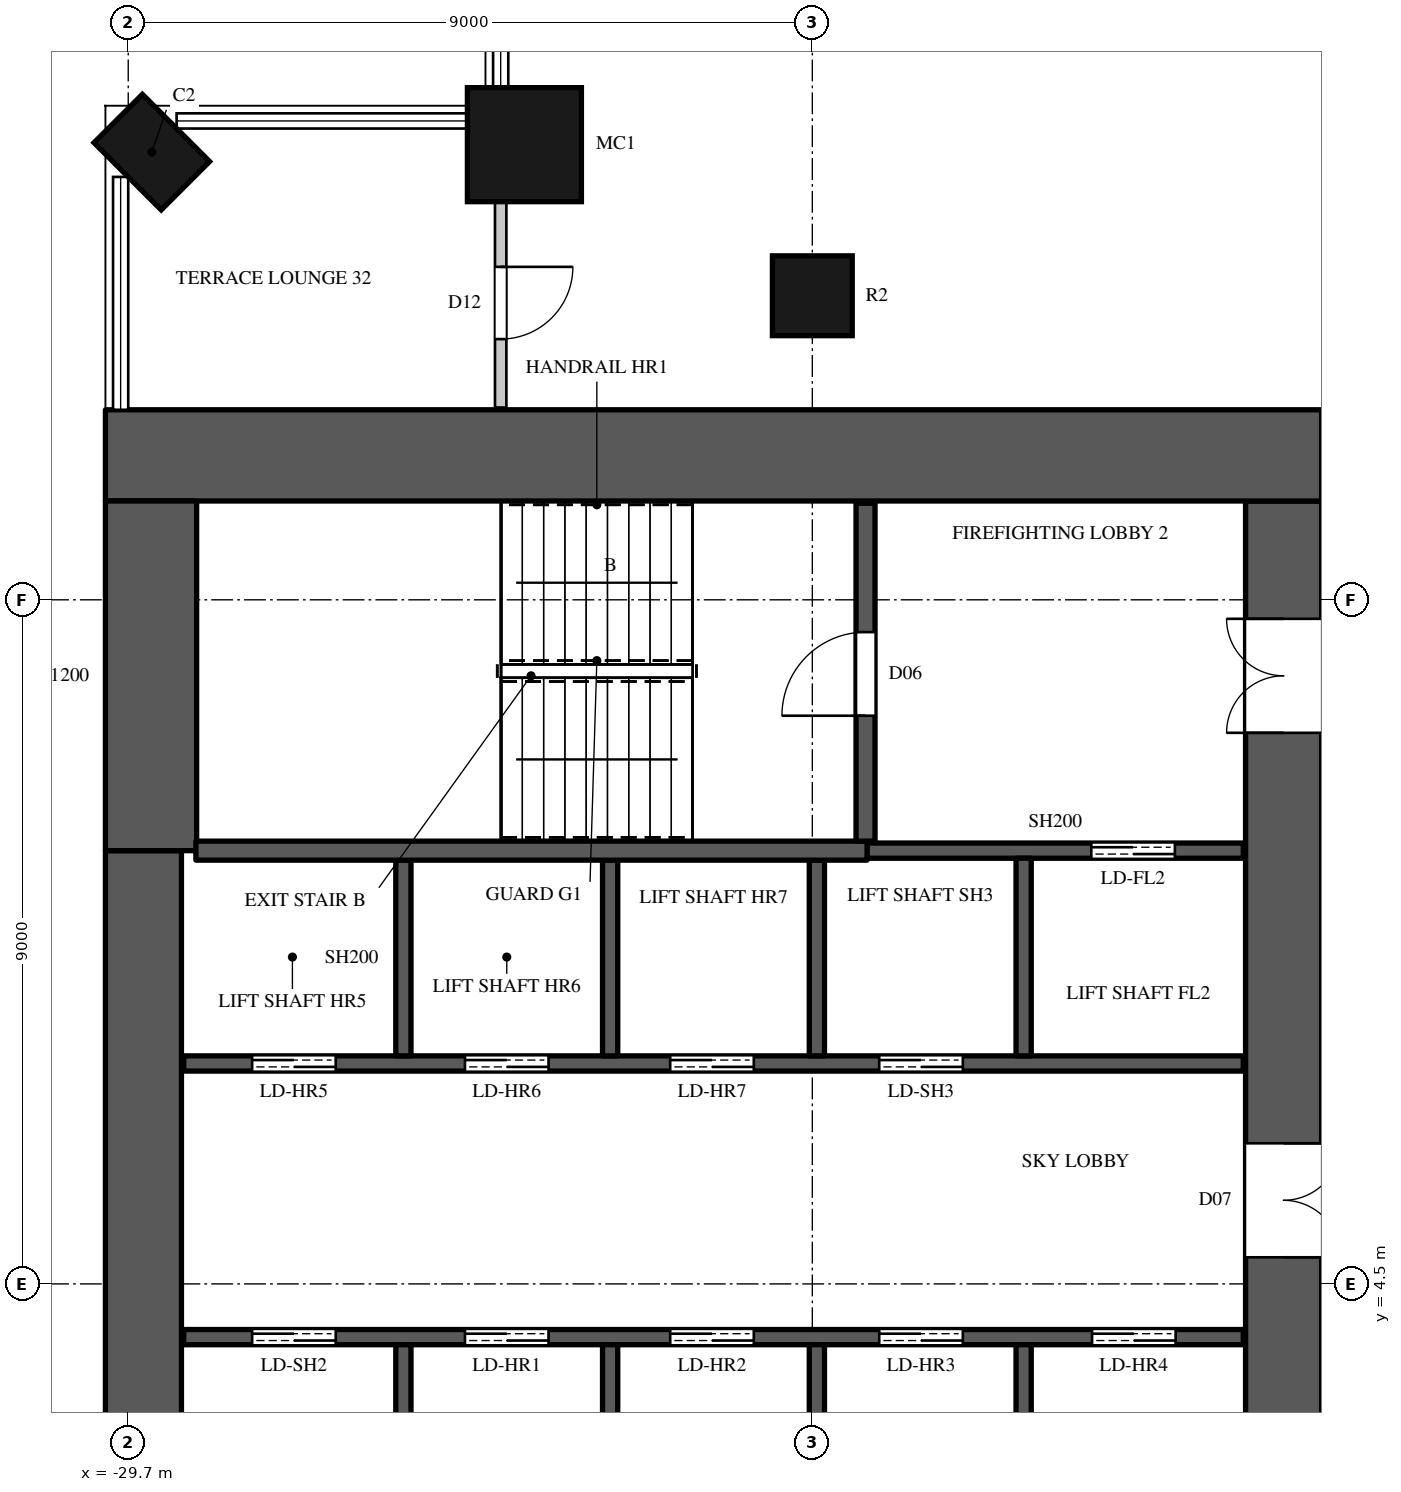
"""IFC4 building model, lengths in metres.
Left out: names, types, materials, properties, quantities, classifications, styles, units other than length and angle.
Written with IfcOpenShell. Run it as: python <this file> out.ifc"""

import sys

from ifc_helpers import new_model, si_unit, direction, frame, frame_2d, origin, origin_2d, place, context, subcontext, project, spatial, rectangle, circle, extrude, element, fill, save


model = new_model("IFC4")
c1 = context("Model", 3, precision=1e-05, world=origin(), true_north=direction((0.0, 1.0)))
c2 = subcontext(c1, "Body", "Model", "MODEL_VIEW")
j1 = project(units=[si_unit("LENGTHUNIT", "METRE"), si_unit("PLANEANGLEUNIT", "RADIAN")], contexts=[c1])
p1 = place(None, origin())
s1 = spatial("IfcSite", under=j1, at=p1, CompositionType="ELEMENT")
p2 = place(p1, origin())
s2 = spatial("IfcBuilding", under=s1, at=p2, CompositionType="ELEMENT")
p3 = place(p2, frame((0.0, 0.0, 145.5)))
s3 = spatial("IfcBuildingStorey", under=s2, at=p3, CompositionType="ELEMENT", Elevation=145.5)
p4 = place(p3, frame((-29.39, 19.39, 0.0), z_axis=(0.0, 0.0, 1.0), x_axis=(-0.707106781187, -0.707106781187, 0.0)))
e1 = element("IfcColumn", 1, at=p4, inside=s3, PredefinedType="COLUMN", context=c2, shape_type="SweptSolid", body=[
    extrude(rectangle(XDim=0.9, YDim=1.25, at=origin_2d()), origin(), (0.0, 0.0, 1.0), 7.0),
])
p5 = place(p3, frame((-24.488, 19.488, 0.0), z_axis=(0.0, 0.0, 1.0), x_axis=(1.0, 0.0, 0.0)))
e2 = element("IfcColumn", 2, at=p5, inside=s3, PredefinedType="COLUMN", context=c2, shape_type="SweptSolid", body=[
    extrude(circle(Radius=0.75, at=origin_2d()), origin(), (0.0, 0.0, 1.0), 7.0),
])
p6 = place(p3, frame((-20.7, 17.5, 0.0), z_axis=(0.0, 0.0, 1.0), x_axis=(1.0, 0.0, 0.0)))
e3 = element("IfcColumn", 3, at=p6, inside=s3, PredefinedType="COLUMN", context=c2, shape_type="SweptSolid", body=[
    extrude(circle(Radius=0.525, at=origin_2d()), origin(), (0.0, 0.0, 1.0), 7.0),
])
p7 = place(p3, frame((-30.0, 15.4, 0.0), z_axis=(0.0, 0.0, 1.0), x_axis=(1.0, 0.0, 0.0)))
e4 = element("IfcWall", 4, at=p7, inside=s3, PredefinedType="SHEAR", context=c2, shape_type="SweptSolid", body=[
    extrude(rectangle(XDim=16.0, YDim=1.2, at=frame_2d((8.0, 0.0))), origin(), (0.0, 0.0, 1.0), 7.0),
])
p8 = place(p3, frame((-14.5, -14.8, 0.0), z_axis=(0.0, 0.0, 1.0), x_axis=(0.0, 1.0, 0.0)))
e5 = element("IfcWall", 5, at=p8, inside=s3, PredefinedType="SHEAR", context=c2, shape_type="SweptSolid", body=[
    extrude(rectangle(XDim=29.6, YDim=1.0, at=frame_2d((14.8, 0.0))), origin(), (0.0, 0.0, 1.0), 7.0),
])
p9 = place(p8, frame((1.55, 0.0, 0.0)))
e6 = element("IfcOpeningElement", 6, at=p9, cuts=e5, PredefinedType="OPENING", context=c2, shape_type="SweptSolid", body=[
    extrude(rectangle(XDim=1.5, YDim=2.4, at=frame_2d((0.75, 1.2))), frame((0.0, 0.51, 0.0), z_axis=(0.0, -1.0, 0.0), x_axis=(1.0, 0.0, 0.0)), (0.0, 0.0, 1.0), 1.02),
])
p10 = place(p8, frame((26.55, 0.0, 0.0)))
e7 = element("IfcOpeningElement", 7, at=p10, cuts=e5, PredefinedType="OPENING", context=c2, shape_type="SweptSolid", body=[
    extrude(rectangle(XDim=1.5, YDim=2.4, at=frame_2d((0.75, 1.2))), frame((0.0, 0.51, 0.0), z_axis=(0.0, -1.0, 0.0), x_axis=(1.0, 0.0, 0.0)), (0.0, 0.0, 1.0), 1.02),
])
p11 = place(p8, frame((8.45, 0.0, 0.0)))
e8 = element("IfcOpeningElement", 8, at=p11, cuts=e5, PredefinedType="OPENING", context=c2, shape_type="SweptSolid", body=[
    extrude(rectangle(XDim=1.5, YDim=2.4, at=frame_2d((0.75, 1.2))), frame((0.0, 0.51, 0.0), z_axis=(0.0, -1.0, 0.0), x_axis=(1.0, 0.0, 0.0)), (0.0, 0.0, 1.0), 1.02),
])
p12 = place(p8, frame((19.65, 0.0, 0.0)))
e9 = element("IfcOpeningElement", 9, at=p12, cuts=e5, PredefinedType="OPENING", context=c2, shape_type="SweptSolid", body=[
    extrude(rectangle(XDim=1.5, YDim=2.4, at=frame_2d((0.75, 1.2))), frame((0.0, 0.51, 0.0), z_axis=(0.0, -1.0, 0.0), x_axis=(1.0, 0.0, 0.0)), (0.0, 0.0, 1.0), 1.02),
])
p13 = place(p8, frame((14.5, 0.0, 0.0)))
e10 = element("IfcOpeningElement", 10, at=p13, cuts=e5, PredefinedType="OPENING", context=c2, shape_type="SweptSolid", body=[
    extrude(rectangle(XDim=0.6, YDim=2.0, at=frame_2d((0.3, 1.0))), frame((0.0, 0.51, 0.0), z_axis=(0.0, -1.0, 0.0), x_axis=(1.0, 0.0, 0.0)), (0.0, 0.0, 1.0), 1.02),
])
p14 = place(p3, frame((-29.5, -10.2, 0.0), z_axis=(0.0, 0.0, 1.0), x_axis=(0.0, 1.0, 0.0)))
e11 = element("IfcWall", 11, at=p14, inside=s3, PredefinedType="SHEAR", context=c2, shape_type="SweptSolid", body=[
    extrude(rectangle(XDim=20.4, YDim=1.0, at=frame_2d((10.2, 0.0))), origin(), (0.0, 0.0, 1.0), 7.0),
])
p15 = place(p3, frame((-29.4, 10.2, 0.0), z_axis=(0.0, 0.0, 1.0), x_axis=(0.0, 1.0, 0.0)))
e12 = element("IfcWall", 12, at=p15, inside=s3, PredefinedType="SHEAR", context=c2, shape_type="SweptSolid", body=[
    extrude(rectangle(XDim=4.6, YDim=1.2, at=frame_2d((2.3, 0.0))), origin(), (0.0, 0.0, 1.0), 7.0),
])
p16 = place(p3, frame((-24.8, 16.03, 0.0), z_axis=(0.0, 0.0, 1.0), x_axis=(0.0, 1.0, 0.0)))
e13 = element("IfcWall", 13, at=p16, inside=s3, PredefinedType="PARTITIONING", context=c2, shape_type="SweptSolid", body=[
    extrude(rectangle(XDim=2.758, YDim=0.15, at=frame_2d((1.379, 0.0))), origin(), (0.0, 0.0, 1.0), 6.7),
])
p17 = place(p16, frame((0.9, 0.0, 0.0)))
e14 = element("IfcOpeningElement", 14, at=p17, cuts=e13, PredefinedType="OPENING", context=c2, shape_type="SweptSolid", body=[
    extrude(rectangle(XDim=0.95, YDim=2.2, at=frame_2d((0.475, 1.1))), frame((0.0, 0.085, 0.0), z_axis=(0.0, -1.0, 0.0), x_axis=(1.0, 0.0, 0.0)), (0.0, 0.0, 1.0), 0.17),
])
p18 = place(p3, frame((-28.97, 3.8, 0.0), z_axis=(0.0, 0.0, 1.0), x_axis=(1.0, 0.0, 0.0)))
e15 = element("IfcWall", 15, at=p18, inside=s3, PredefinedType="SHEAR", context=c2, shape_type="SweptSolid", body=[
    extrude(rectangle(XDim=13.94, YDim=0.2, at=frame_2d((6.97, 0.0))), origin(), (0.0, 0.0, 1.0), 6.7),
])
p19 = place(p18, frame((0.9, 0.0, 0.0)))
e16 = element("IfcOpeningElement", 16, at=p19, cuts=e15, PredefinedType="OPENING", context=c2, shape_type="SweptSolid", body=[
    extrude(rectangle(XDim=1.1, YDim=2.2, at=frame_2d((0.55, 1.1))), frame((0.0, 0.11, 0.0), z_axis=(0.0, -1.0, 0.0), x_axis=(1.0, 0.0, 0.0)), (0.0, 0.0, 1.0), 0.22),
])
p20 = place(p18, frame((3.7, 0.0, 0.0)))
e17 = element("IfcOpeningElement", 17, at=p20, cuts=e15, PredefinedType="OPENING", context=c2, shape_type="SweptSolid", body=[
    extrude(rectangle(XDim=1.1, YDim=2.2, at=frame_2d((0.55, 1.1))), frame((0.0, 0.11, 0.0), z_axis=(0.0, -1.0, 0.0), x_axis=(1.0, 0.0, 0.0)), (0.0, 0.0, 1.0), 0.22),
])
p21 = place(p18, frame((6.4, 0.0, 0.0)))
e18 = element("IfcOpeningElement", 18, at=p21, cuts=e15, PredefinedType="OPENING", context=c2, shape_type="SweptSolid", body=[
    extrude(rectangle(XDim=1.1, YDim=2.2, at=frame_2d((0.55, 1.1))), frame((0.0, 0.11, 0.0), z_axis=(0.0, -1.0, 0.0), x_axis=(1.0, 0.0, 0.0)), (0.0, 0.0, 1.0), 0.22),
])
p22 = place(p18, frame((9.15, 0.0, 0.0)))
e19 = element("IfcOpeningElement", 19, at=p22, cuts=e15, PredefinedType="OPENING", context=c2, shape_type="SweptSolid", body=[
    extrude(rectangle(XDim=1.1, YDim=2.2, at=frame_2d((0.55, 1.1))), frame((0.0, 0.11, 0.0), z_axis=(0.0, -1.0, 0.0), x_axis=(1.0, 0.0, 0.0)), (0.0, 0.0, 1.0), 0.22),
])
p23 = place(p18, frame((11.95, 0.0, 0.0)))
e20 = element("IfcOpeningElement", 20, at=p23, cuts=e15, PredefinedType="OPENING", context=c2, shape_type="SweptSolid", body=[
    extrude(rectangle(XDim=1.1, YDim=2.2, at=frame_2d((0.55, 1.1))), frame((0.0, 0.11, 0.0), z_axis=(0.0, -1.0, 0.0), x_axis=(1.0, 0.0, 0.0)), (0.0, 0.0, 1.0), 0.22),
])
p24 = place(p3, frame((-28.97, 7.4, 0.0), z_axis=(0.0, 0.0, 1.0), x_axis=(1.0, 0.0, 0.0)))
e21 = element("IfcWall", 21, at=p24, inside=s3, PredefinedType="SHEAR", context=c2, shape_type="SweptSolid", body=[
    extrude(rectangle(XDim=13.94, YDim=0.2, at=frame_2d((6.97, 0.0))), origin(), (0.0, 0.0, 1.0), 6.7),
])
p25 = place(p24, frame((0.9, 0.0, 0.0)))
e22 = element("IfcOpeningElement", 22, at=p25, cuts=e21, PredefinedType="OPENING", context=c2, shape_type="SweptSolid", body=[
    extrude(rectangle(XDim=1.1, YDim=2.2, at=frame_2d((0.55, 1.1))), frame((0.0, 0.11, 0.0), z_axis=(0.0, -1.0, 0.0), x_axis=(1.0, 0.0, 0.0)), (0.0, 0.0, 1.0), 0.22),
])
p26 = place(p24, frame((3.7, 0.0, 0.0)))
e23 = element("IfcOpeningElement", 23, at=p26, cuts=e21, PredefinedType="OPENING", context=c2, shape_type="SweptSolid", body=[
    extrude(rectangle(XDim=1.1, YDim=2.2, at=frame_2d((0.55, 1.1))), frame((0.0, 0.11, 0.0), z_axis=(0.0, -1.0, 0.0), x_axis=(1.0, 0.0, 0.0)), (0.0, 0.0, 1.0), 0.22),
])
p27 = place(p24, frame((6.4, 0.0, 0.0)))
e24 = element("IfcOpeningElement", 24, at=p27, cuts=e21, PredefinedType="OPENING", context=c2, shape_type="SweptSolid", body=[
    extrude(rectangle(XDim=1.1, YDim=2.2, at=frame_2d((0.55, 1.1))), frame((0.0, 0.11, 0.0), z_axis=(0.0, -1.0, 0.0), x_axis=(1.0, 0.0, 0.0)), (0.0, 0.0, 1.0), 0.22),
])
p28 = place(p24, frame((9.15, 0.0, 0.0)))
e25 = element("IfcOpeningElement", 25, at=p28, cuts=e21, PredefinedType="OPENING", context=c2, shape_type="SweptSolid", body=[
    extrude(rectangle(XDim=1.1, YDim=2.2, at=frame_2d((0.55, 1.1))), frame((0.0, 0.11, 0.0), z_axis=(0.0, -1.0, 0.0), x_axis=(1.0, 0.0, 0.0)), (0.0, 0.0, 1.0), 0.22),
])
p29 = place(p3, frame((-26.08, 1.1, 0.0), z_axis=(0.0, 0.0, 1.0), x_axis=(0.0, 1.0, 0.0)))
e26 = element("IfcWall", 26, at=p29, inside=s3, PredefinedType="SHEAR", context=c2, shape_type="SweptSolid", body=[
    extrude(rectangle(XDim=2.6, YDim=0.2, at=frame_2d((1.3, 0.0))), origin(), (0.0, 0.0, 1.0), 6.7),
])
p30 = place(p3, frame((-26.08, 7.5, -1.0), z_axis=(0.0, 0.0, 1.0), x_axis=(0.0, 1.0, 0.0)))
e27 = element("IfcWall", 27, at=p30, inside=s3, PredefinedType="SHEAR", context=c2, shape_type="SweptSolid", body=[
    extrude(rectangle(XDim=2.575, YDim=0.2, at=frame_2d((1.288, 0.0))), origin(), (0.0, 0.0, 1.0), 8.0),
])
p31 = place(p3, frame((-23.36, 1.1, -1.0), z_axis=(0.0, 0.0, 1.0), x_axis=(0.0, 1.0, 0.0)))
e28 = element("IfcWall", 28, at=p31, inside=s3, PredefinedType="SHEAR", context=c2, shape_type="SweptSolid", body=[
    extrude(rectangle(XDim=2.6, YDim=0.2, at=frame_2d((1.3, 0.0))), origin(), (0.0, 0.0, 1.0), 8.0),
])
p32 = place(p3, frame((-23.36, 7.5, -1.0), z_axis=(0.0, 0.0, 1.0), x_axis=(0.0, 1.0, 0.0)))
e29 = element("IfcWall", 29, at=p32, inside=s3, PredefinedType="SHEAR", context=c2, shape_type="SweptSolid", body=[
    extrude(rectangle(XDim=2.575, YDim=0.2, at=frame_2d((1.288, 0.0))), origin(), (0.0, 0.0, 1.0), 8.0),
])
p33 = place(p3, frame((-20.64, 1.1, -1.0), z_axis=(0.0, 0.0, 1.0), x_axis=(0.0, 1.0, 0.0)))
e30 = element("IfcWall", 30, at=p33, inside=s3, PredefinedType="SHEAR", context=c2, shape_type="SweptSolid", body=[
    extrude(rectangle(XDim=2.6, YDim=0.2, at=frame_2d((1.3, 0.0))), origin(), (0.0, 0.0, 1.0), 8.0),
])
p34 = place(p3, frame((-20.64, 7.5, 0.0), z_axis=(0.0, 0.0, 1.0), x_axis=(0.0, 1.0, 0.0)))
e31 = element("IfcWall", 31, at=p34, inside=s3, PredefinedType="SHEAR", context=c2, shape_type="SweptSolid", body=[
    extrude(rectangle(XDim=2.575, YDim=0.2, at=frame_2d((1.288, 0.0))), origin(), (0.0, 0.0, 1.0), 6.7),
])
p35 = place(p3, frame((-19.98, 10.2, 0.0), z_axis=(0.0, 0.0, 1.0), x_axis=(1.0, 0.0, 0.0)))
e32 = element("IfcWall", 32, at=p35, inside=s3, PredefinedType="SHEAR", context=c2, shape_type="SweptSolid", body=[
    extrude(rectangle(XDim=4.95, YDim=0.2, at=frame_2d((2.475, 0.0))), origin(), (0.0, 0.0, 1.0), 6.7),
])
p36 = place(p35, frame((2.95, 0.0, 0.0)))
e33 = element("IfcOpeningElement", 33, at=p36, cuts=e32, PredefinedType="OPENING", context=c2, shape_type="SweptSolid", body=[
    extrude(rectangle(XDim=1.1, YDim=2.2, at=frame_2d((0.55, 1.1))), frame((0.0, 0.11, 0.0), z_axis=(0.0, -1.0, 0.0), x_axis=(1.0, 0.0, 0.0)), (0.0, 0.0, 1.0), 0.22),
])
p37 = place(p3, frame((-17.92, 1.1, -1.0), z_axis=(0.0, 0.0, 1.0), x_axis=(0.0, 1.0, 0.0)))
e34 = element("IfcWall", 34, at=p37, inside=s3, PredefinedType="SHEAR", context=c2, shape_type="SweptSolid", body=[
    extrude(rectangle(XDim=2.6, YDim=0.2, at=frame_2d((1.3, 0.0))), origin(), (0.0, 0.0, 1.0), 8.0),
])
p38 = place(p3, frame((-17.92, 7.5, 0.0), z_axis=(0.0, 0.0, 1.0), x_axis=(0.0, 1.0, 0.0)))
e35 = element("IfcWall", 35, at=p38, inside=s3, PredefinedType="SHEAR", context=c2, shape_type="SweptSolid", body=[
    extrude(rectangle(XDim=2.6, YDim=0.2, at=frame_2d((1.3, 0.0))), origin(), (0.0, 0.0, 1.0), 6.7),
])
p39 = place(p3, frame((-28.81, 10.2, 0.0), z_axis=(0.0, 0.0, 1.0), x_axis=(1.0, 0.0, 0.0)))
e36 = element("IfcWall", 36, at=p39, inside=s3, PredefinedType="SHEAR", context=c2, shape_type="SweptSolid", body=[
    extrude(rectangle(XDim=8.83, YDim=0.25, at=frame_2d((4.415, 0.0))), origin(), (0.0, 0.0, 1.0), 6.7),
])
p40 = place(p3, frame((-20.0, 10.325, 0.0), z_axis=(0.0, 0.0, 1.0), x_axis=(0.0, 1.0, 0.0)))
e37 = element("IfcWall", 37, at=p40, inside=s3, PredefinedType="SHEAR", context=c2, shape_type="SweptSolid", body=[
    extrude(rectangle(XDim=4.445, YDim=0.25, at=frame_2d((2.223, 0.0))), origin(), (0.0, 0.0, 1.0), 6.7),
])
p41 = place(p40, frame((1.65, 0.0, 0.0)))
e38 = element("IfcOpeningElement", 38, at=p41, cuts=e37, PredefinedType="OPENING", context=c2, shape_type="SweptSolid", body=[
    extrude(rectangle(XDim=1.1, YDim=2.2, at=frame_2d((0.55, 1.1))), frame((0.0, 0.135, 0.0), z_axis=(0.0, -1.0, 0.0), x_axis=(1.0, 0.0, 0.0)), (0.0, 0.0, 1.0), 0.27),
])
p42 = place(p41, origin())
e39 = element("IfcDoor", 39, at=p42, inside=s3, OperationType="SINGLE_SWING_LEFT", PredefinedType="DOOR", context=c2, shape_type="SweptSolid", body=[
    extrude(rectangle(XDim=1.1, YDim=2.2, at=frame_2d((0.55, 1.1))), frame((0.0, 0.025, 0.0), z_axis=(0.0, -1.0, 0.0), x_axis=(1.0, 0.0, 0.0)), (0.0, 0.0, 1.0), 0.05),
])
fill(e38, e39)
p43 = place(p19, origin())
e40 = element("IfcDoor", 40, at=p43, inside=s3, OperationType="DOUBLE_DOOR_SLIDING", PredefinedType="DOOR", context=c2, shape_type="SweptSolid", body=[
    extrude(rectangle(XDim=1.1, YDim=2.2, at=frame_2d((0.55, 1.1))), frame((0.0, 0.025, 0.0), z_axis=(0.0, -1.0, 0.0), x_axis=(1.0, 0.0, 0.0)), (0.0, 0.0, 1.0), 0.05),
])
fill(e16, e40)
p44 = place(p20, origin())
e41 = element("IfcDoor", 41, at=p44, inside=s3, OperationType="DOUBLE_DOOR_SLIDING", PredefinedType="DOOR", context=c2, shape_type="SweptSolid", body=[
    extrude(rectangle(XDim=1.1, YDim=2.2, at=frame_2d((0.55, 1.1))), frame((0.0, 0.025, 0.0), z_axis=(0.0, -1.0, 0.0), x_axis=(1.0, 0.0, 0.0)), (0.0, 0.0, 1.0), 0.05),
])
fill(e17, e41)
p45 = place(p21, origin())
e42 = element("IfcDoor", 42, at=p45, inside=s3, OperationType="DOUBLE_DOOR_SLIDING", PredefinedType="DOOR", context=c2, shape_type="SweptSolid", body=[
    extrude(rectangle(XDim=1.1, YDim=2.2, at=frame_2d((0.55, 1.1))), frame((0.0, 0.025, 0.0), z_axis=(0.0, -1.0, 0.0), x_axis=(1.0, 0.0, 0.0)), (0.0, 0.0, 1.0), 0.05),
])
fill(e18, e42)
p46 = place(p22, origin())
e43 = element("IfcDoor", 43, at=p46, inside=s3, OperationType="DOUBLE_DOOR_SLIDING", PredefinedType="DOOR", context=c2, shape_type="SweptSolid", body=[
    extrude(rectangle(XDim=1.1, YDim=2.2, at=frame_2d((0.55, 1.1))), frame((0.0, 0.025, 0.0), z_axis=(0.0, -1.0, 0.0), x_axis=(1.0, 0.0, 0.0)), (0.0, 0.0, 1.0), 0.05),
])
fill(e19, e43)
p47 = place(p23, origin())
e44 = element("IfcDoor", 44, at=p47, inside=s3, OperationType="DOUBLE_DOOR_SLIDING", PredefinedType="DOOR", context=c2, shape_type="SweptSolid", body=[
    extrude(rectangle(XDim=1.1, YDim=2.2, at=frame_2d((0.55, 1.1))), frame((0.0, 0.025, 0.0), z_axis=(0.0, -1.0, 0.0), x_axis=(1.0, 0.0, 0.0)), (0.0, 0.0, 1.0), 0.05),
])
fill(e20, e44)
p48 = place(p25, origin())
e45 = element("IfcDoor", 45, at=p48, inside=s3, OperationType="DOUBLE_DOOR_SLIDING", PredefinedType="DOOR", context=c2, shape_type="SweptSolid", body=[
    extrude(rectangle(XDim=1.1, YDim=2.2, at=frame_2d((0.55, 1.1))), frame((0.0, 0.025, 0.0), z_axis=(0.0, -1.0, 0.0), x_axis=(1.0, 0.0, 0.0)), (0.0, 0.0, 1.0), 0.05),
])
fill(e22, e45)
p49 = place(p26, origin())
e46 = element("IfcDoor", 46, at=p49, inside=s3, OperationType="DOUBLE_DOOR_SLIDING", PredefinedType="DOOR", context=c2, shape_type="SweptSolid", body=[
    extrude(rectangle(XDim=1.1, YDim=2.2, at=frame_2d((0.55, 1.1))), frame((0.0, 0.025, 0.0), z_axis=(0.0, -1.0, 0.0), x_axis=(1.0, 0.0, 0.0)), (0.0, 0.0, 1.0), 0.05),
])
fill(e23, e46)
p50 = place(p27, origin())
e47 = element("IfcDoor", 47, at=p50, inside=s3, OperationType="DOUBLE_DOOR_SLIDING", PredefinedType="DOOR", context=c2, shape_type="SweptSolid", body=[
    extrude(rectangle(XDim=1.1, YDim=2.2, at=frame_2d((0.55, 1.1))), frame((0.0, 0.025, 0.0), z_axis=(0.0, -1.0, 0.0), x_axis=(1.0, 0.0, 0.0)), (0.0, 0.0, 1.0), 0.05),
])
fill(e24, e47)
p51 = place(p28, origin())
e48 = element("IfcDoor", 48, at=p51, inside=s3, OperationType="DOUBLE_DOOR_SLIDING", PredefinedType="DOOR", context=c2, shape_type="SweptSolid", body=[
    extrude(rectangle(XDim=1.1, YDim=2.2, at=frame_2d((0.55, 1.1))), frame((0.0, 0.025, 0.0), z_axis=(0.0, -1.0, 0.0), x_axis=(1.0, 0.0, 0.0)), (0.0, 0.0, 1.0), 0.05),
])
fill(e25, e48)
p52 = place(p36, origin())
e49 = element("IfcDoor", 49, at=p52, inside=s3, OperationType="DOUBLE_DOOR_SLIDING", PredefinedType="DOOR", context=c2, shape_type="SweptSolid", body=[
    extrude(rectangle(XDim=1.1, YDim=2.2, at=frame_2d((0.55, 1.1))), frame((0.0, 0.025, 0.0), z_axis=(0.0, -1.0, 0.0), x_axis=(1.0, 0.0, 0.0)), (0.0, 0.0, 1.0), 0.05),
])
fill(e33, e49)
p53 = place(p17, origin())
e50 = element("IfcDoor", 50, at=p53, inside=s3, OperationType="SINGLE_SWING_LEFT", PredefinedType="DOOR", context=c2, shape_type="SweptSolid", body=[
    extrude(rectangle(XDim=0.95, YDim=2.2, at=frame_2d((0.475, 1.1))), frame((0.0, 0.025, 0.0), z_axis=(0.0, -1.0, 0.0), x_axis=(1.0, 0.0, 0.0)), (0.0, 0.0, 1.0), 0.05),
])
fill(e14, e50)
p54 = place(p10, origin())
e51 = element("IfcDoor", 51, at=p54, inside=s3, OperationType="DOUBLE_DOOR_SINGLE_SWING", PredefinedType="DOOR", context=c2, shape_type="SweptSolid", body=[
    extrude(rectangle(XDim=1.5, YDim=2.4, at=frame_2d((0.75, 1.2))), frame((0.0, 0.495, 0.0), z_axis=(0.0, -1.0, 0.0), x_axis=(1.0, 0.0, 0.0)), (0.0, 0.0, 1.0), 0.05),
])
fill(e7, e51)
p55 = place(p12, origin())
e52 = element("IfcDoor", 52, at=p55, inside=s3, OperationType="DOUBLE_DOOR_SINGLE_SWING", PredefinedType="DOOR", context=c2, shape_type="SweptSolid", body=[
    extrude(rectangle(XDim=1.5, YDim=2.4, at=frame_2d((0.75, 1.2))), frame((0.0, -0.445, 0.0), z_axis=(0.0, -1.0, 0.0), x_axis=(1.0, 0.0, 0.0)), (0.0, 0.0, 1.0), 0.05),
])
fill(e9, e52)
save(model, sys.argv[1])
